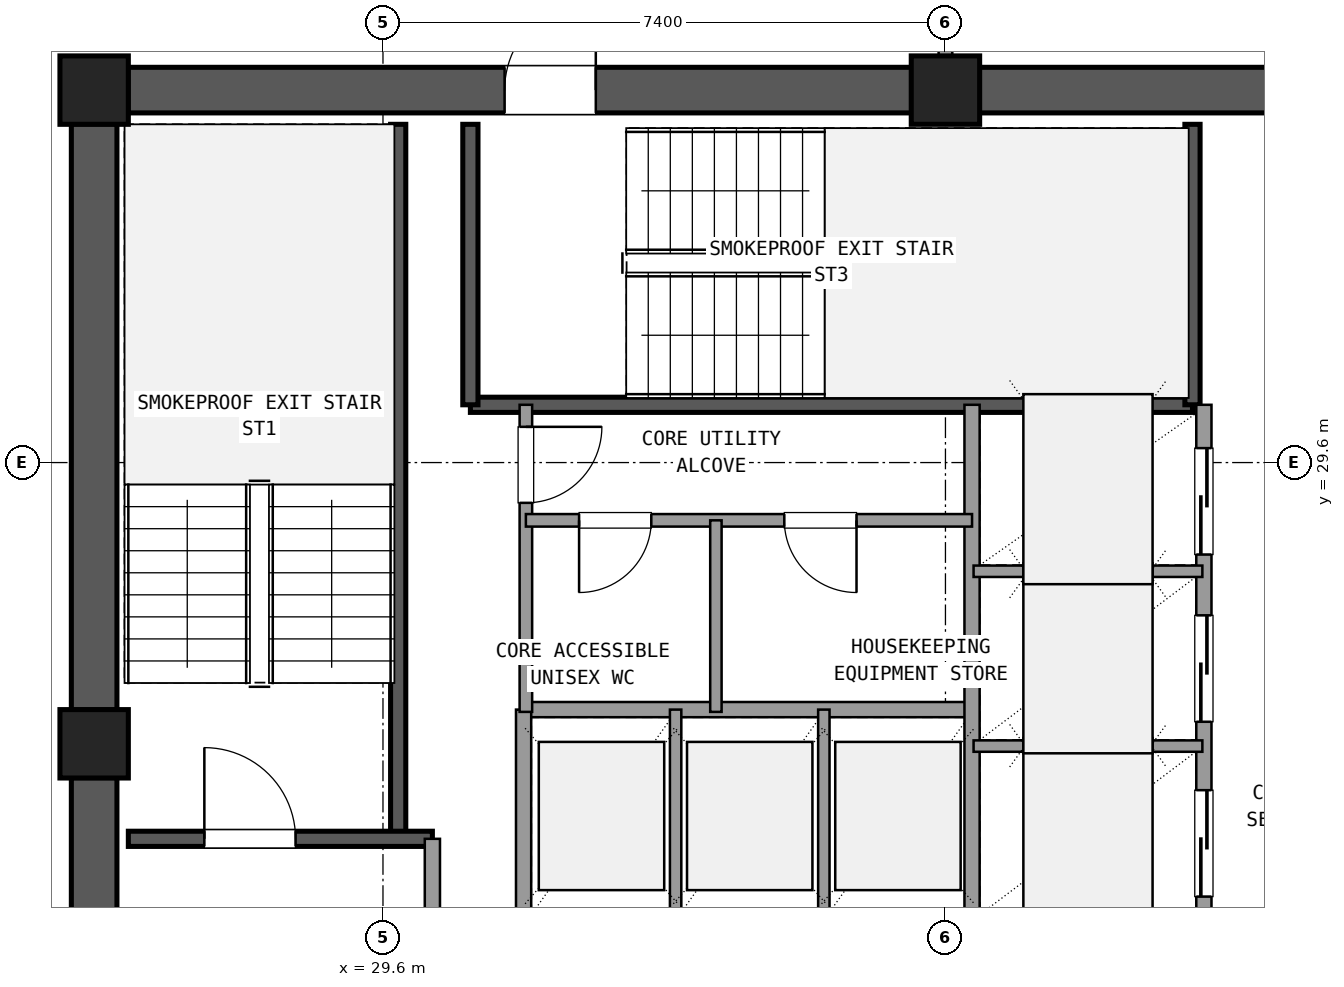
"""IFC4 building model, lengths in metres.
Left out: names, types, materials, properties, quantities, classifications, styles, units other than length and angle.
Written with IfcOpenShell. Run it as: python <this file> out.ifc"""

import sys

from ifc_helpers import new_model, si_unit, direction, frame, frame_2d, origin, origin_2d, place, context, subcontext, project, spatial, rectangle, extrude, element, fill, save


model = new_model("IFC4")
c1 = context("Model", 3, precision=1e-05, world=origin(), true_north=direction((0.0, 1.0)))
c2 = subcontext(c1, "Body", "Model", "MODEL_VIEW")
j1 = project(units=[si_unit("LENGTHUNIT", "METRE"), si_unit("PLANEANGLEUNIT", "RADIAN")], contexts=[c1])
p1 = place(None, origin())
s1 = spatial("IfcSite", under=j1, at=p1, CompositionType="ELEMENT")
p2 = place(p1, origin())
s2 = spatial("IfcBuilding", under=s1, at=p2, CompositionType="ELEMENT")
p3 = place(p2, frame((0.0, 0.0, 225.18)))
s3 = spatial("IfcBuildingStorey", under=s2, at=p3, CompositionType="ELEMENT", Elevation=225.18)
for number, where, z_axis, x_axis in (
    (1, (37.0, 34.5, 0.0), (0.0, 0.0, 1.0), (1.0, 0.0, 0.0)),
    (2, (25.8, 34.5, 0.0), (0.0, 0.0, 1.0), (1.0, 0.0, 0.0)),
    (3, (25.8, 25.9, 0.0), (0.0, 0.0, 1.0), (1.0, 0.0, 0.0)),
):
    element("IfcColumn", number, at=place(p3, frame(where, z_axis=z_axis, x_axis=x_axis)), inside=s3, PredefinedType="COLUMN", context=c2, shape_type="SweptSolid", body=[
        extrude(rectangle(XDim=0.9, YDim=0.9, at=origin_2d()), origin(), (0.0, 0.0, 1.0), 3.6),
    ])
p4 = place(p3, frame((47.755, 34.5, 0.0), z_axis=(0.0, 0.0, 1.0), x_axis=(-1.0, 0.0, 0.0)))
e4 = element("IfcWall", 4, at=p4, inside=s3, PredefinedType="SHEAR", context=c2, shape_type="SweptSolid", body=[
    extrude(rectangle(XDim=10.31, YDim=0.6, at=frame_2d((5.155, 0.0))), origin(), (0.0, 0.0, 1.0), 3.32),
])
p5 = place(p4, frame((4.655, 0.0, 0.0)))
e5 = element("IfcOpeningElement", 5, at=p5, cuts=e4, PredefinedType="OPENING", context=c2, shape_type="SweptSolid", body=[
    extrude(rectangle(XDim=1.6, YDim=2.2, at=frame_2d((0.8, 1.1))), frame((0.0, 0.31, 0.0), z_axis=(0.0, -1.0, 0.0), x_axis=(1.0, 0.0, 0.0)), (0.0, 0.0, 1.0), 0.62),
])
p6 = place(p3, frame((36.555, 34.5, 0.0), z_axis=(0.0, 0.0, 1.0), x_axis=(-1.0, 0.0, 0.0)))
e6 = element("IfcWall", 6, at=p6, inside=s3, PredefinedType="SHEAR", context=c2, shape_type="SweptSolid", body=[
    extrude(rectangle(XDim=10.31, YDim=0.6, at=frame_2d((5.155, 0.0))), origin(), (0.0, 0.0, 1.0), 3.32),
])
p7 = place(p6, frame((4.155, 0.0, 0.0)))
e7 = element("IfcOpeningElement", 7, at=p7, cuts=e6, PredefinedType="OPENING", context=c2, shape_type="SweptSolid", body=[
    extrude(rectangle(XDim=1.2, YDim=2.15, at=frame_2d((0.6, 1.075))), frame((0.0, 0.31, 0.0), z_axis=(0.0, -1.0, 0.0), x_axis=(1.0, 0.0, 0.0)), (0.0, 0.0, 1.0), 0.62),
])
p8 = place(p3, frame((25.8, 34.055, 0.0), z_axis=(0.0, 0.0, 1.0), x_axis=(0.0, -1.0, 0.0)))
e8 = element("IfcWall", 8, at=p8, inside=s3, PredefinedType="SHEAR", context=c2, shape_type="SweptSolid", body=[
    extrude(rectangle(XDim=7.71, YDim=0.6, at=frame_2d((3.855, 0.0))), origin(), (0.0, 0.0, 1.0), 3.32),
])
p9 = place(p3, frame((25.8, 25.455, 0.0), z_axis=(0.0, 0.0, 1.0), x_axis=(0.0, -1.0, 0.0)))
e9 = element("IfcWall", 9, at=p9, inside=s3, PredefinedType="SHEAR", context=c2, shape_type="SweptSolid", body=[
    extrude(rectangle(XDim=7.71, YDim=0.6, at=frame_2d((3.855, 0.0))), origin(), (0.0, 0.0, 1.0), 3.32),
])
p10 = place(p9, frame((2.205, 0.0, 0.0)))
e10 = element("IfcOpeningElement", 10, at=p10, cuts=e9, PredefinedType="OPENING", context=c2, shape_type="SweptSolid", body=[
    extrude(rectangle(XDim=1.2, YDim=2.15, at=frame_2d((0.6, 1.075))), frame((0.0, 0.31, 0.0), z_axis=(0.0, -1.0, 0.0), x_axis=(1.0, 0.0, 0.0)), (0.0, 0.0, 1.0), 0.62),
])
p11 = place(p3, frame((29.8, 24.65, 0.0), z_axis=(0.0, 0.0, 1.0), x_axis=(0.0, 1.0, 0.0)))
e11 = element("IfcWall", 11, at=p11, inside=s3, PredefinedType="SHEAR", context=c2, shape_type="SweptSolid", body=[
    extrude(rectangle(XDim=9.4, YDim=0.2, at=frame_2d((4.7, 0.0))), origin(), (0.0, 0.0, 1.0), 3.32),
])
p12 = place(p3, frame((26.25, 24.65, 0.0), z_axis=(0.0, 0.0, 1.0), x_axis=(1.0, 0.0, 0.0)))
e12 = element("IfcWall", 12, at=p12, inside=s3, PredefinedType="SHEAR", context=c2, shape_type="SweptSolid", body=[
    extrude(rectangle(XDim=4.0, YDim=0.2, at=frame_2d((2.0, 0.0))), origin(), (0.0, 0.0, 1.0), 3.32),
])
p13 = place(p12, frame((1.0, 0.0, 0.0)))
e13 = element("IfcOpeningElement", 13, at=p13, cuts=e12, PredefinedType="OPENING", context=c2, shape_type="SweptSolid", body=[
    extrude(rectangle(XDim=1.2, YDim=2.15, at=frame_2d((0.6, 1.075))), frame((0.0, 0.11, 0.0), z_axis=(0.0, -1.0, 0.0), x_axis=(1.0, 0.0, 0.0)), (0.0, 0.0, 1.0), 0.22),
])
p14 = place(p3, frame((30.75, 30.36, 0.0), z_axis=(0.0, 0.0, 1.0), x_axis=(1.0, 0.0, 0.0)))
e14 = element("IfcWall", 14, at=p14, inside=s3, PredefinedType="SHEAR", context=c2, shape_type="SweptSolid", body=[
    extrude(rectangle(XDim=9.5, YDim=0.2, at=frame_2d((4.75, 0.0))), origin(), (0.0, 0.0, 1.0), 3.32),
])
for number, where, z_axis, x_axis in (
    (15, (30.75, 30.36, 0.0), (0.0, 0.0, 1.0), (0.0, 1.0, 0.0)),
    (16, (40.25, 30.36, 0.0), (0.0, 0.0, 1.0), (0.0, 1.0, 0.0)),
):
    element("IfcWall", number, at=place(p3, frame(where, z_axis=z_axis, x_axis=x_axis)), inside=s3, PredefinedType="SHEAR", context=c2, shape_type="SweptSolid", body=[
        extrude(rectangle(XDim=3.69, YDim=0.2, at=frame_2d((1.845, 0.0))), origin(), (0.0, 0.0, 1.0), 3.32),
    ])
p15 = place(p3, frame((30.25, 17.75, 0.0), z_axis=(0.0, 0.0, 1.0), x_axis=(0.0, 1.0, 0.0)))
e17 = element("IfcWall", 17, at=p15, inside=s3, PredefinedType="SOLIDWALL", context=c2, shape_type="SweptSolid", body=[
    extrude(rectangle(XDim=6.9, YDim=0.2, at=frame_2d((3.45, 0.0))), origin(), (0.0, 0.0, 1.0), 2.61),
])
p16 = place(p15, frame((4.15, 0.0, 0.0)))
e18 = element("IfcOpeningElement", 18, at=p16, cuts=e17, PredefinedType="OPENING", context=c2, shape_type="SweptSolid", body=[
    extrude(rectangle(XDim=1.2, YDim=2.15, at=frame_2d((0.6, 1.075))), frame((0.0, 0.11, 0.0), z_axis=(0.0, -1.0, 0.0), x_axis=(1.0, 0.0, 0.0)), (0.0, 0.0, 1.0), 0.22),
])
p17 = place(p3, frame((31.45, 26.35, 0.0), z_axis=(0.0, 0.0, 1.0), x_axis=(1.0, 0.0, 0.0)))
e19 = element("IfcWall", 19, at=p17, inside=s3, PredefinedType="SOLIDWALL", context=c2, shape_type="SweptSolid", body=[
    extrude(rectangle(XDim=5.9, YDim=0.2, at=frame_2d((2.95, 0.0))), origin(), (0.0, 0.0, 1.0), 2.61),
])
p18 = place(p3, frame((31.45, 23.54, 0.0), z_axis=(0.0, 0.0, 1.0), x_axis=(0.0, 1.0, 0.0)))
e20 = element("IfcWall", 20, at=p18, inside=s3, PredefinedType="SOLIDWALL", context=c2, shape_type="SweptSolid", body=[
    extrude(rectangle(XDim=2.81, YDim=0.2, at=frame_2d((1.405, 0.0))), origin(), (0.0, 0.0, 1.0), 2.61),
])
for number, where, z_axis, x_axis in (
    (21, (33.45, 23.54, 0.0), (0.0, 0.0, 1.0), (0.0, 1.0, 0.0)),
    (22, (35.4, 23.54, 0.0), (0.0, 0.0, 1.0), (0.0, 1.0, 0.0)),
):
    element("IfcWall", number, at=place(p3, frame(where, z_axis=z_axis, x_axis=x_axis)), inside=s3, PredefinedType="PARTITIONING", context=c2, shape_type="SweptSolid", body=[
        extrude(rectangle(XDim=2.81, YDim=0.15, at=frame_2d((1.405, 0.0))), origin(), (0.0, 0.0, 1.0), 2.61),
    ])
p19 = place(p3, frame((37.35, 23.54, 0.0), z_axis=(0.0, 0.0, 1.0), x_axis=(0.0, 1.0, 0.0)))
e23 = element("IfcWall", 23, at=p19, inside=s3, PredefinedType="SOLIDWALL", context=c2, shape_type="SweptSolid", body=[
    extrude(rectangle(XDim=6.82, YDim=0.2, at=frame_2d((3.41, 0.0))), origin(), (0.0, 0.0, 1.0), 2.61),
])
p20 = place(p3, frame((40.4, 23.54, 0.0), z_axis=(0.0, 0.0, 1.0), x_axis=(0.0, 1.0, 0.0)))
e24 = element("IfcWall", 24, at=p20, inside=s3, PredefinedType="SOLIDWALL", context=c2, shape_type="SweptSolid", body=[
    extrude(rectangle(XDim=6.82, YDim=0.2, at=frame_2d((3.41, 0.0))), origin(), (0.0, 0.0, 1.0), 2.61),
])
p21 = place(p20, frame((0.35, 0.0, 0.0)))
e25 = element("IfcOpeningElement", 25, at=p21, cuts=e24, PredefinedType="OPENING", context=c2, shape_type="SweptSolid", body=[
    extrude(rectangle(XDim=1.4, YDim=2.2, at=frame_2d((0.7, 1.1))), frame((0.0, 0.11, 0.0), z_axis=(0.0, -1.0, 0.0), x_axis=(1.0, 0.0, 0.0)), (0.0, 0.0, 1.0), 0.22),
])
p22 = place(p20, frame((2.65, 0.0, 0.0)))
e26 = element("IfcOpeningElement", 26, at=p22, cuts=e24, PredefinedType="OPENING", context=c2, shape_type="SweptSolid", body=[
    extrude(rectangle(XDim=1.4, YDim=2.2, at=frame_2d((0.7, 1.1))), frame((0.0, 0.11, 0.0), z_axis=(0.0, -1.0, 0.0), x_axis=(1.0, 0.0, 0.0)), (0.0, 0.0, 1.0), 0.22),
])
p23 = place(p20, frame((4.85, 0.0, 0.0)))
e27 = element("IfcOpeningElement", 27, at=p23, cuts=e24, PredefinedType="OPENING", context=c2, shape_type="SweptSolid", body=[
    extrude(rectangle(XDim=1.4, YDim=2.2, at=frame_2d((0.7, 1.1))), frame((0.0, 0.11, 0.0), z_axis=(0.0, -1.0, 0.0), x_axis=(1.0, 0.0, 0.0)), (0.0, 0.0, 1.0), 0.22),
])
for number, where, z_axis, x_axis in (
    (28, (37.37, 25.87, 0.0), (0.0, 0.0, 1.0), (1.0, 0.0, 0.0)),
    (29, (37.37, 28.17, 0.0), (0.0, 0.0, 1.0), (1.0, 0.0, 0.0)),
):
    element("IfcWall", number, at=place(p3, frame(where, z_axis=z_axis, x_axis=x_axis)), inside=s3, PredefinedType="PARTITIONING", context=c2, shape_type="SweptSolid", body=[
        extrude(rectangle(XDim=3.01, YDim=0.15, at=frame_2d((1.505, 0.0))), origin(), (0.0, 0.0, 1.0), 2.61),
    ])
p24 = place(p3, frame((31.48, 26.32, 0.0), z_axis=(0.0, 0.0, 1.0), x_axis=(0.0, 1.0, 0.0)))
e30 = element("IfcWall", 30, at=p24, inside=s3, PredefinedType="PLUMBINGWALL", context=c2, shape_type="SweptSolid", body=[
    extrude(rectangle(XDim=4.04, YDim=0.165, at=frame_2d((2.02, 0.0))), origin(), (0.0, 0.0, 1.0), 2.61),
])
p25 = place(p24, frame((2.75, 0.0, 0.0)))
e31 = element("IfcOpeningElement", 31, at=p25, cuts=e30, PredefinedType="OPENING", context=c2, shape_type="SweptSolid", body=[
    extrude(rectangle(XDim=1.0, YDim=2.15, at=frame_2d((0.5, 1.075))), frame((0.0, 0.093, 0.0), z_axis=(0.0, -1.0, 0.0), x_axis=(1.0, 0.0, 0.0)), (0.0, 0.0, 1.0), 0.185),
])
p26 = place(p3, frame((31.48, 28.84, 0.0), z_axis=(0.0, 0.0, 1.0), x_axis=(1.0, 0.0, 0.0)))
e32 = element("IfcWall", 32, at=p26, inside=s3, PredefinedType="PLUMBINGWALL", context=c2, shape_type="SweptSolid", body=[
    extrude(rectangle(XDim=5.87, YDim=0.165, at=frame_2d((2.935, 0.0))), origin(), (0.0, 0.0, 1.0), 2.61),
])
p27 = place(p26, frame((0.7, 0.0, 0.0)))
e33 = element("IfcOpeningElement", 33, at=p27, cuts=e32, PredefinedType="OPENING", context=c2, shape_type="SweptSolid", body=[
    extrude(rectangle(XDim=0.95, YDim=2.1, at=frame_2d((0.475, 1.05))), frame((0.0, 0.093, 0.0), z_axis=(0.0, -1.0, 0.0), x_axis=(1.0, 0.0, 0.0)), (0.0, 0.0, 1.0), 0.185),
])
p28 = place(p26, frame((3.4, 0.0, 0.0)))
e34 = element("IfcOpeningElement", 34, at=p28, cuts=e32, PredefinedType="OPENING", context=c2, shape_type="SweptSolid", body=[
    extrude(rectangle(XDim=0.95, YDim=2.1, at=frame_2d((0.475, 1.05))), frame((0.0, 0.093, 0.0), z_axis=(0.0, -1.0, 0.0), x_axis=(1.0, 0.0, 0.0)), (0.0, 0.0, 1.0), 0.185),
])
p29 = place(p3, frame((33.98, 26.32, 0.0), z_axis=(0.0, 0.0, 1.0), x_axis=(0.0, 1.0, 0.0)))
e35 = element("IfcWall", 35, at=p29, inside=s3, PredefinedType="PARTITIONING", context=c2, shape_type="SweptSolid", body=[
    extrude(rectangle(XDim=2.52, YDim=0.15, at=frame_2d((1.26, 0.0))), origin(), (0.0, 0.0, 1.0), 2.61),
])
p30 = place(p3, frame((37.0, 34.95, 0.0), z_axis=(0.0, 0.0, 1.0), x_axis=(0.0, 1.0, 0.0)))
e36 = element("IfcWall", 36, at=p30, inside=s3, PredefinedType="PARTITIONING", context=c2, shape_type="SweptSolid", body=[
    extrude(rectangle(XDim=2.7, YDim=0.18, at=frame_2d((1.35, 0.0))), origin(), (0.0, 0.0, 1.0), 2.61),
])
p31 = place(p30, frame((0.35, 0.0, 0.0)))
e37 = element("IfcOpeningElement", 37, at=p31, cuts=e36, PredefinedType="OPENING", context=c2, shape_type="SweptSolid", body=[
    extrude(rectangle(XDim=2.0, YDim=2.2, at=frame_2d((1.0, 1.1))), frame((0.0, 0.1, 0.0), z_axis=(0.0, -1.0, 0.0), x_axis=(1.0, 0.0, 0.0)), (0.0, 0.0, 1.0), 0.2),
])
p32 = place(p13, origin())
e38 = element("IfcDoor", 38, at=p32, inside=s3, OperationType="SINGLE_SWING_LEFT", PredefinedType="DOOR", context=c2, shape_type="SweptSolid", body=[
    extrude(rectangle(XDim=1.2, YDim=2.15, at=frame_2d((0.6, 1.075))), frame((0.0, 0.025, 0.0), z_axis=(0.0, -1.0, 0.0), x_axis=(1.0, 0.0, 0.0)), (0.0, 0.0, 1.0), 0.05),
])
fill(e13, e38)
p33 = place(p7, frame((1.2, 0.0, 0.0), z_axis=(0.0, 0.0, 1.0), x_axis=(-1.0, 0.0, 0.0)))
e39 = element("IfcDoor", 39, at=p33, inside=s3, OperationType="SINGLE_SWING_LEFT", PredefinedType="DOOR", context=c2, shape_type="SweptSolid", body=[
    extrude(rectangle(XDim=1.2, YDim=2.15, at=frame_2d((0.6, 1.075))), frame((0.0, 0.025, 0.0), z_axis=(0.0, -1.0, 0.0), x_axis=(1.0, 0.0, 0.0)), (0.0, 0.0, 1.0), 0.05),
])
fill(e7, e39)
p34 = place(p21, origin())
e40 = element("IfcDoor", 40, at=p34, inside=s3, OperationType="SLIDING_TO_LEFT", PredefinedType="DOOR", context=c2, shape_type="SweptSolid", body=[
    extrude(rectangle(XDim=1.4, YDim=2.2, at=frame_2d((0.7, 1.1))), frame((0.0, 0.025, 0.0), z_axis=(0.0, -1.0, 0.0), x_axis=(1.0, 0.0, 0.0)), (0.0, 0.0, 1.0), 0.05),
])
fill(e25, e40)
p35 = place(p22, origin())
e41 = element("IfcDoor", 41, at=p35, inside=s3, OperationType="SLIDING_TO_LEFT", PredefinedType="DOOR", context=c2, shape_type="SweptSolid", body=[
    extrude(rectangle(XDim=1.4, YDim=2.2, at=frame_2d((0.7, 1.1))), frame((0.0, 0.025, 0.0), z_axis=(0.0, -1.0, 0.0), x_axis=(1.0, 0.0, 0.0)), (0.0, 0.0, 1.0), 0.05),
])
fill(e26, e41)
p36 = place(p23, origin())
e42 = element("IfcDoor", 42, at=p36, inside=s3, OperationType="SLIDING_TO_RIGHT", PredefinedType="DOOR", context=c2, shape_type="SweptSolid", body=[
    extrude(rectangle(XDim=1.4, YDim=2.2, at=frame_2d((0.7, 1.1))), frame((0.0, 0.025, 0.0), z_axis=(0.0, -1.0, 0.0), x_axis=(1.0, 0.0, 0.0)), (0.0, 0.0, 1.0), 0.05),
])
fill(e27, e42)
p37 = place(p25, frame((1.0, 0.0, 0.0), z_axis=(0.0, 0.0, 1.0), x_axis=(-1.0, 0.0, 0.0)))
e43 = element("IfcDoor", 43, at=p37, inside=s3, OperationType="SINGLE_SWING_RIGHT", PredefinedType="DOOR", context=c2, shape_type="SweptSolid", body=[
    extrude(rectangle(XDim=1.0, YDim=2.15, at=frame_2d((0.5, 1.075))), frame((0.0, 0.025, 0.0), z_axis=(0.0, -1.0, 0.0), x_axis=(1.0, 0.0, 0.0)), (0.0, 0.0, 1.0), 0.05),
])
fill(e31, e43)
p38 = place(p27, frame((0.95, 0.0, 0.0), z_axis=(0.0, 0.0, 1.0), x_axis=(-1.0, 0.0, 0.0)))
e44 = element("IfcDoor", 44, at=p38, inside=s3, OperationType="SINGLE_SWING_LEFT", PredefinedType="DOOR", context=c2, shape_type="SweptSolid", body=[
    extrude(rectangle(XDim=0.95, YDim=2.1, at=frame_2d((0.475, 1.05))), frame((0.0, 0.025, 0.0), z_axis=(0.0, -1.0, 0.0), x_axis=(1.0, 0.0, 0.0)), (0.0, 0.0, 1.0), 0.05),
])
fill(e33, e44)
p39 = place(p28, frame((0.95, 0.0, 0.0), z_axis=(0.0, 0.0, 1.0), x_axis=(-1.0, 0.0, 0.0)))
e45 = element("IfcDoor", 45, at=p39, inside=s3, OperationType="SINGLE_SWING_RIGHT", PredefinedType="DOOR", context=c2, shape_type="SweptSolid", body=[
    extrude(rectangle(XDim=0.95, YDim=2.1, at=frame_2d((0.475, 1.05))), frame((0.0, 0.025, 0.0), z_axis=(0.0, -1.0, 0.0), x_axis=(1.0, 0.0, 0.0)), (0.0, 0.0, 1.0), 0.05),
])
fill(e34, e45)
save(model, sys.argv[1])
